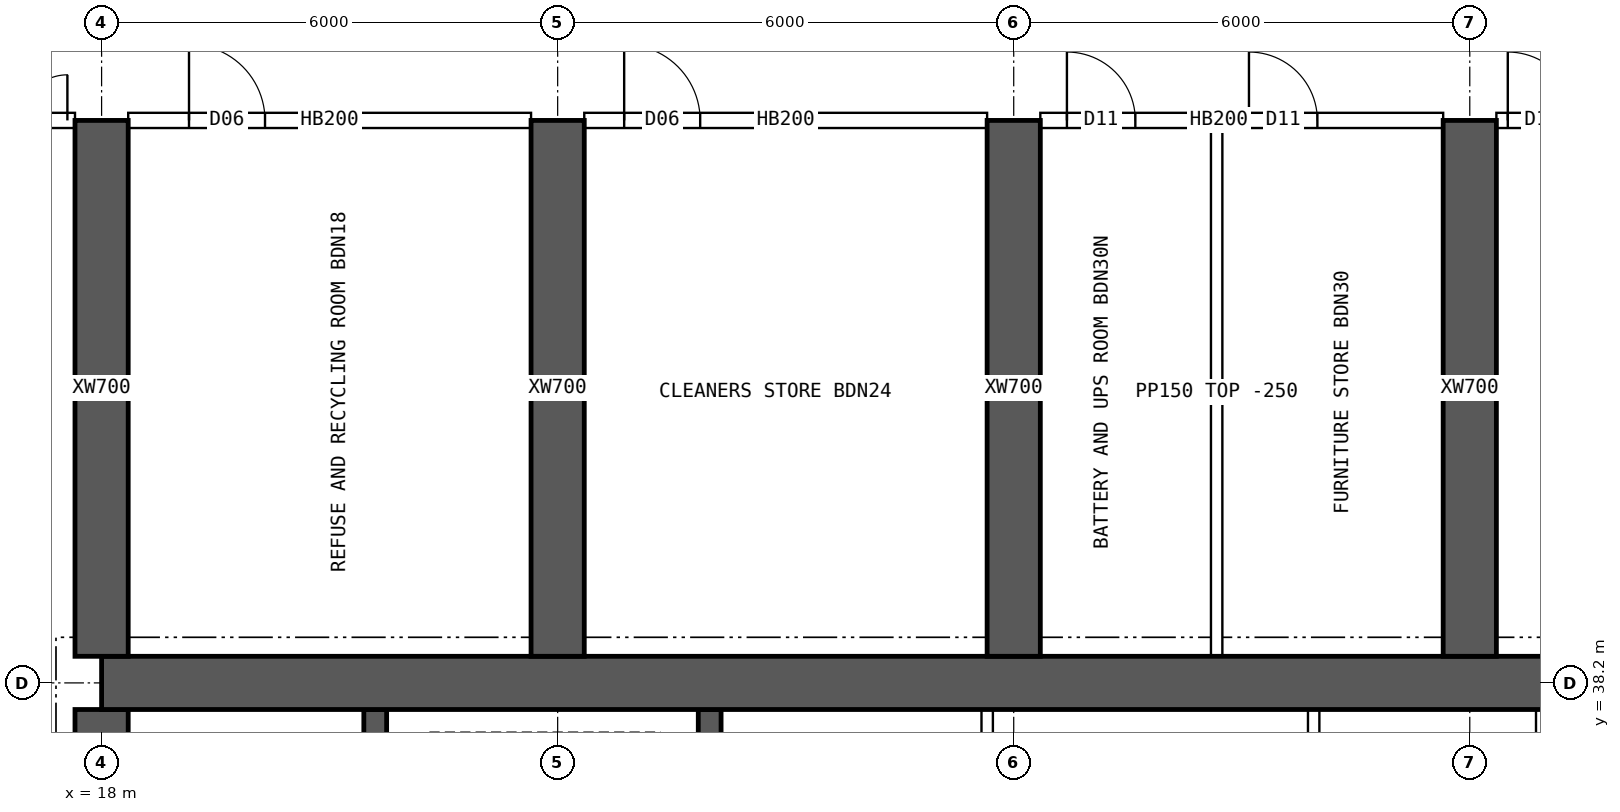
"""IFC4 building model, lengths in metres.
Left out: names, types, materials, properties, quantities, classifications, styles, units other than length and angle.
Written with IfcOpenShell. Run it as: python <this file> out.ifc"""

import sys

from ifc_helpers import new_model, si_unit, direction, frame, frame_2d, origin, place, context, subcontext, project, spatial, rectangle, extrude, element, fill, save


model = new_model("IFC4")
c1 = context("Model", 3, precision=1e-05, world=origin(), true_north=direction((0.0, 1.0)))
c2 = subcontext(c1, "Body", "Model", "MODEL_VIEW")
j1 = project(units=[si_unit("LENGTHUNIT", "METRE"), si_unit("PLANEANGLEUNIT", "RADIAN")], contexts=[c1])
p1 = place(None, origin())
s1 = spatial("IfcSite", under=j1, at=p1, CompositionType="ELEMENT")
p2 = place(p1, origin())
s2 = spatial("IfcBuilding", under=s1, at=p2, CompositionType="ELEMENT")
p3 = place(p2, frame((0.0, 0.0, 231.55)))
s3 = spatial("IfcBuildingStorey", under=s2, at=p3, CompositionType="ELEMENT", Elevation=231.55)
p4 = place(p3, frame((18.0, 38.2, 0.0), z_axis=(0.0, 0.0, 1.0), x_axis=(1.0, 0.0, 0.0)))
e1 = element("IfcWall", 1, at=p4, inside=s3, PredefinedType="SHEAR", context=c2, shape_type="SweptSolid", body=[
    extrude(rectangle(XDim=48.0, YDim=0.7, at=frame_2d((24.0, 0.0))), origin(), (0.0, 0.0, 1.0), 3.75),
])
p5 = place(p3, frame((18.0, 26.15, 0.0), z_axis=(0.0, 0.0, 1.0), x_axis=(0.0, 1.0, 0.0)))
e2 = element("IfcWall", 2, at=p5, inside=s3, PredefinedType="SHEAR", context=c2, shape_type="SweptSolid", body=[
    extrude(rectangle(XDim=11.7, YDim=0.7, at=frame_2d((5.85, 0.0))), origin(), (0.0, 0.0, 1.0), 3.75),
])
p6 = place(p5, frame((5.15, 0.0, 0.0)))
e3 = element("IfcOpeningElement", 3, at=p6, cuts=e2, PredefinedType="OPENING", context=c2, shape_type="SweptSolid", body=[
    extrude(rectangle(XDim=1.2, YDim=2.1, at=frame_2d((0.6, 1.05))), frame((0.0, 0.36, 0.0), z_axis=(0.0, -1.0, 0.0), x_axis=(1.0, 0.0, 0.0)), (0.0, 0.0, 1.0), 0.72),
])
for number, where, z_axis, x_axis in (
    (4, (21.6, 34.75, 0.0), (0.0, 0.0, 1.0), (0.0, 1.0, 0.0)),
    (5, (26.0, 34.75, 0.0), (0.0, 0.0, 1.0), (0.0, 1.0, 0.0)),
):
    element("IfcWall", number, at=place(p3, frame(where, z_axis=z_axis, x_axis=x_axis)), inside=s3, PredefinedType="SHEAR", context=c2, shape_type="SweptSolid", body=[
        extrude(rectangle(XDim=3.1, YDim=0.3, at=frame_2d((1.55, 0.0))), origin(), (0.0, 0.0, 1.0), 3.75),
    ])
for number, where, z_axis, x_axis in (
    (6, (18.0, 38.55, 0.0), (0.0, 0.0, 1.0), (0.0, 1.0, 0.0)),
    (7, (24.0, 38.55, 0.0), (0.0, 0.0, 1.0), (0.0, 1.0, 0.0)),
    (8, (30.0, 38.55, 0.0), (0.0, 0.0, 1.0), (0.0, 1.0, 0.0)),
    (9, (36.0, 38.55, 0.0), (0.0, 0.0, 1.0), (0.0, 1.0, 0.0)),
):
    element("IfcWall", number, at=place(p3, frame(where, z_axis=z_axis, x_axis=x_axis)), inside=s3, PredefinedType="SHEAR", context=c2, shape_type="SweptSolid", body=[
        extrude(rectangle(XDim=7.05, YDim=0.7, at=frame_2d((3.525, 0.0))), origin(), (0.0, 0.0, 1.0), 3.75),
    ])
for number, where, z_axis, x_axis in (
    (10, (29.651, 34.75, 0.0), (0.0, 0.0, 1.0), (0.0, 1.0, 0.0)),
    (11, (33.946, 34.75, 0.0), (0.0, 0.0, 1.0), (0.0, 1.0, 0.0)),
    (12, (36.946, 34.75, 0.0), (0.0, 0.0, 1.0), (0.0, 1.0, 0.0)),
):
    element("IfcWall", number, at=place(p3, frame(where, z_axis=z_axis, x_axis=x_axis)), inside=s3, PredefinedType="SOLIDWALL", context=c2, shape_type="SweptSolid", body=[
        extrude(rectangle(XDim=3.1, YDim=0.15, at=frame_2d((1.55, 0.0))), origin(), (0.0, 0.0, 1.0), 3.5),
    ])
p7 = place(p3, frame((15.6, 45.6, 0.0), z_axis=(0.0, 0.0, 1.0), x_axis=(1.0, 0.0, 0.0)))
e13 = element("IfcWall", 13, at=p7, inside=s3, PredefinedType="SOLIDWALL", context=c2, shape_type="SweptSolid", body=[
    extrude(rectangle(XDim=2.05, YDim=0.2, at=frame_2d((1.025, 0.0))), origin(), (0.0, 0.0, 1.0), 3.5),
])
p8 = place(p7, frame((0.75, 0.0, 0.0)))
e14 = element("IfcOpeningElement", 14, at=p8, cuts=e13, PredefinedType="OPENING", context=c2, shape_type="SweptSolid", body=[
    extrude(rectangle(XDim=1.2, YDim=2.1, at=frame_2d((0.6, 1.05))), frame((0.0, 0.11, 0.0), z_axis=(0.0, -1.0, 0.0), x_axis=(1.0, 0.0, 0.0)), (0.0, 0.0, 1.0), 0.22),
])
p9 = place(p3, frame((18.35, 45.6, 0.0), z_axis=(0.0, 0.0, 1.0), x_axis=(1.0, 0.0, 0.0)))
e15 = element("IfcWall", 15, at=p9, inside=s3, PredefinedType="SOLIDWALL", context=c2, shape_type="SweptSolid", body=[
    extrude(rectangle(XDim=5.3, YDim=0.2, at=frame_2d((2.65, 0.0))), origin(), (0.0, 0.0, 1.0), 3.5),
])
p10 = place(p9, frame((0.8, 0.0, 0.0)))
e16 = element("IfcOpeningElement", 16, at=p10, cuts=e15, PredefinedType="OPENING", context=c2, shape_type="SweptSolid", body=[
    extrude(rectangle(XDim=1.0, YDim=2.1, at=frame_2d((0.5, 1.05))), frame((0.0, 0.11, 0.0), z_axis=(0.0, -1.0, 0.0), x_axis=(1.0, 0.0, 0.0)), (0.0, 0.0, 1.0), 0.22),
])
p11 = place(p3, frame((24.35, 45.6, 0.0), z_axis=(0.0, 0.0, 1.0), x_axis=(1.0, 0.0, 0.0)))
e17 = element("IfcWall", 17, at=p11, inside=s3, PredefinedType="SOLIDWALL", context=c2, shape_type="SweptSolid", body=[
    extrude(rectangle(XDim=5.3, YDim=0.2, at=frame_2d((2.65, 0.0))), origin(), (0.0, 0.0, 1.0), 3.5),
])
p12 = place(p11, frame((0.525, 0.0, 0.0)))
e18 = element("IfcOpeningElement", 18, at=p12, cuts=e17, PredefinedType="OPENING", context=c2, shape_type="SweptSolid", body=[
    extrude(rectangle(XDim=1.0, YDim=2.1, at=frame_2d((0.5, 1.05))), frame((0.0, 0.11, 0.0), z_axis=(0.0, -1.0, 0.0), x_axis=(1.0, 0.0, 0.0)), (0.0, 0.0, 1.0), 0.22),
])
p13 = place(p3, frame((30.35, 45.6, 0.0), z_axis=(0.0, 0.0, 1.0), x_axis=(1.0, 0.0, 0.0)))
e19 = element("IfcWall", 19, at=p13, inside=s3, PredefinedType="SOLIDWALL", context=c2, shape_type="SweptSolid", body=[
    extrude(rectangle(XDim=5.3, YDim=0.2, at=frame_2d((2.65, 0.0))), origin(), (0.0, 0.0, 1.0), 3.5),
])
p14 = place(p13, frame((0.35, 0.0, 0.0)))
e20 = element("IfcOpeningElement", 20, at=p14, cuts=e19, PredefinedType="OPENING", context=c2, shape_type="SweptSolid", body=[
    extrude(rectangle(XDim=0.9, YDim=2.1, at=frame_2d((0.45, 1.05))), frame((0.0, 0.11, 0.0), z_axis=(0.0, -1.0, 0.0), x_axis=(1.0, 0.0, 0.0)), (0.0, 0.0, 1.0), 0.22),
])
p15 = place(p13, frame((2.745, 0.0, 0.0)))
e21 = element("IfcOpeningElement", 21, at=p15, cuts=e19, PredefinedType="OPENING", context=c2, shape_type="SweptSolid", body=[
    extrude(rectangle(XDim=0.9, YDim=2.1, at=frame_2d((0.45, 1.05))), frame((0.0, 0.11, 0.0), z_axis=(0.0, -1.0, 0.0), x_axis=(1.0, 0.0, 0.0)), (0.0, 0.0, 1.0), 0.22),
])
p16 = place(p3, frame((36.35, 45.6, 0.0), z_axis=(0.0, 0.0, 1.0), x_axis=(1.0, 0.0, 0.0)))
e22 = element("IfcWall", 22, at=p16, inside=s3, PredefinedType="SOLIDWALL", context=c2, shape_type="SweptSolid", body=[
    extrude(rectangle(XDim=5.3, YDim=0.2, at=frame_2d((2.65, 0.0))), origin(), (0.0, 0.0, 1.0), 3.5),
])
p17 = place(p16, frame((0.15, 0.0, 0.0)))
e23 = element("IfcOpeningElement", 23, at=p17, cuts=e22, PredefinedType="OPENING", context=c2, shape_type="SweptSolid", body=[
    extrude(rectangle(XDim=0.9, YDim=2.1, at=frame_2d((0.45, 1.05))), frame((0.0, 0.11, 0.0), z_axis=(0.0, -1.0, 0.0), x_axis=(1.0, 0.0, 0.0)), (0.0, 0.0, 1.0), 0.22),
])
p18 = place(p16, frame((3.395, 0.0, 0.0)))
e24 = element("IfcOpeningElement", 24, at=p18, cuts=e22, PredefinedType="OPENING", context=c2, shape_type="SweptSolid", body=[
    extrude(rectangle(XDim=0.9, YDim=2.1, at=frame_2d((0.45, 1.05))), frame((0.0, 0.11, 0.0), z_axis=(0.0, -1.0, 0.0), x_axis=(1.0, 0.0, 0.0)), (0.0, 0.0, 1.0), 0.22),
])
p19 = place(p3, frame((32.67, 38.55, 0.0), z_axis=(0.0, 0.0, 1.0), x_axis=(0.0, 1.0, 0.0)))
e25 = element("IfcWall", 25, at=p19, inside=s3, PredefinedType="PARTITIONING", context=c2, shape_type="SweptSolid", body=[
    extrude(rectangle(XDim=6.95, YDim=0.15, at=frame_2d((3.475, 0.0))), origin(), (0.0, 0.0, 1.0), 3.5),
])
p20 = place(p8, origin())
e26 = element("IfcDoor", 26, at=p20, inside=s3, OperationType="DOUBLE_DOOR_SINGLE_SWING", PredefinedType="DOOR", context=c2, shape_type="SweptSolid", body=[
    extrude(rectangle(XDim=1.2, YDim=2.1, at=frame_2d((0.6, 1.05))), frame((0.0, 0.025, 0.0), z_axis=(0.0, -1.0, 0.0), x_axis=(1.0, 0.0, 0.0)), (0.0, 0.0, 1.0), 0.05),
])
fill(e14, e26)
p21 = place(p10, origin())
e27 = element("IfcDoor", 27, at=p21, inside=s3, OperationType="SINGLE_SWING_LEFT", PredefinedType="DOOR", context=c2, shape_type="SweptSolid", body=[
    extrude(rectangle(XDim=1.0, YDim=2.1, at=frame_2d((0.5, 1.05))), frame((0.0, 0.025, 0.0), z_axis=(0.0, -1.0, 0.0), x_axis=(1.0, 0.0, 0.0)), (0.0, 0.0, 1.0), 0.05),
])
fill(e16, e27)
p22 = place(p12, origin())
e28 = element("IfcDoor", 28, at=p22, inside=s3, OperationType="SINGLE_SWING_LEFT", PredefinedType="DOOR", context=c2, shape_type="SweptSolid", body=[
    extrude(rectangle(XDim=1.0, YDim=2.1, at=frame_2d((0.5, 1.05))), frame((0.0, 0.025, 0.0), z_axis=(0.0, -1.0, 0.0), x_axis=(1.0, 0.0, 0.0)), (0.0, 0.0, 1.0), 0.05),
])
fill(e18, e28)
p23 = place(p14, origin())
e29 = element("IfcDoor", 29, at=p23, inside=s3, OperationType="SINGLE_SWING_LEFT", PredefinedType="DOOR", context=c2, shape_type="SweptSolid", body=[
    extrude(rectangle(XDim=0.9, YDim=2.1, at=frame_2d((0.45, 1.05))), frame((0.0, 0.025, 0.0), z_axis=(0.0, -1.0, 0.0), x_axis=(1.0, 0.0, 0.0)), (0.0, 0.0, 1.0), 0.05),
])
fill(e20, e29)
p24 = place(p15, origin())
e30 = element("IfcDoor", 30, at=p24, inside=s3, OperationType="SINGLE_SWING_LEFT", PredefinedType="DOOR", context=c2, shape_type="SweptSolid", body=[
    extrude(rectangle(XDim=0.9, YDim=2.1, at=frame_2d((0.45, 1.05))), frame((0.0, 0.025, 0.0), z_axis=(0.0, -1.0, 0.0), x_axis=(1.0, 0.0, 0.0)), (0.0, 0.0, 1.0), 0.05),
])
fill(e21, e30)
p25 = place(p17, origin())
e31 = element("IfcDoor", 31, at=p25, inside=s3, OperationType="SINGLE_SWING_LEFT", PredefinedType="DOOR", context=c2, shape_type="SweptSolid", body=[
    extrude(rectangle(XDim=0.9, YDim=2.1, at=frame_2d((0.45, 1.05))), frame((0.0, 0.025, 0.0), z_axis=(0.0, -1.0, 0.0), x_axis=(1.0, 0.0, 0.0)), (0.0, 0.0, 1.0), 0.05),
])
fill(e23, e31)
save(model, sys.argv[1])
